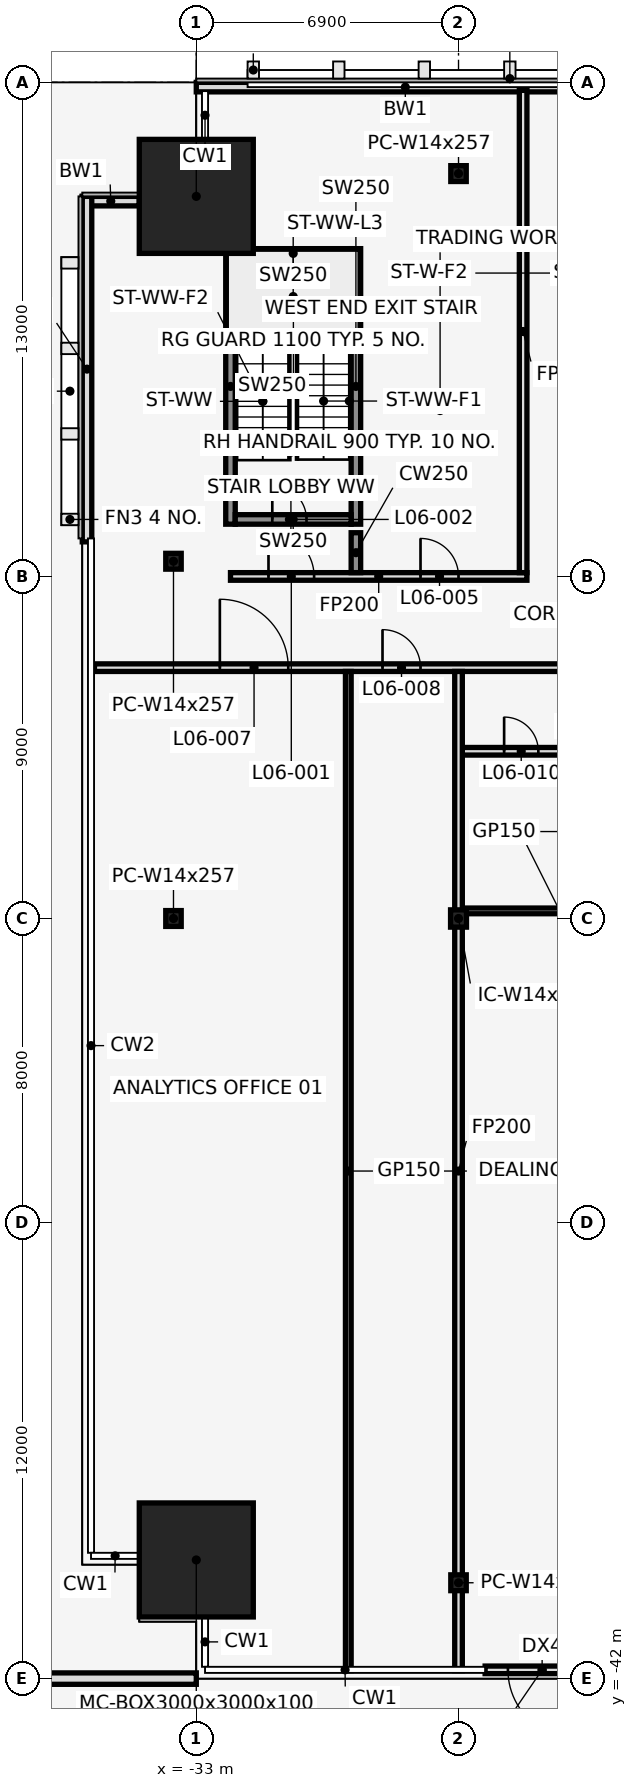
"""IFC4 building model, lengths in metres.
Left out: names, types, materials, properties, quantities, classifications, styles, units other than length and angle.
Written with IfcOpenShell. Run it as: python <this file> out.ifc"""

import sys

from ifc_helpers import new_model, si_unit, direction, frame, frame_2d, origin, origin_2d, place, context, subcontext, project, spatial, rectangle, hollow_rectangle, i_section, extrude, element, fill, save


model = new_model("IFC4")
c1 = context("Model", 3, precision=1e-05, world=origin(), true_north=direction((0.0, 1.0)))
c2 = subcontext(c1, "Body", "Model", "MODEL_VIEW")
j1 = project(units=[si_unit("LENGTHUNIT", "METRE"), si_unit("PLANEANGLEUNIT", "RADIAN")], contexts=[c1])
p1 = place(None, origin())
s1 = spatial("IfcSite", under=j1, at=p1, CompositionType="ELEMENT")
p2 = place(p1, origin())
s2 = spatial("IfcBuilding", under=s1, at=p2, CompositionType="ELEMENT")
p3 = place(p2, frame((0.0, 0.0, 35.0)))
s3 = spatial("IfcBuildingStorey", under=s2, at=p3, CompositionType="ELEMENT", Elevation=35.0)
for number, where, z_axis, x_axis in (
    (1, (-33.0, -38.878, 0.0), (0.0, 0.0, 1.0), (1.0, 0.0, 0.0)),
    (2, (-33.0, -3.0, 0.0), (0.0, 0.0, 1.0), (1.0, 0.0, 0.0)),
):
    element("IfcColumn", number, at=place(p3, frame(where, z_axis=z_axis, x_axis=x_axis)), inside=s3, PredefinedType="COLUMN", context=c2, shape_type="SweptSolid", body=[
        extrude(hollow_rectangle(XDim=3.0, YDim=3.0, WallThickness=0.1, at=origin_2d()), origin(), (0.0, 0.0, 1.0), 4.5),
    ])
for number, where, z_axis, x_axis in (
    (3, (-26.1, -39.478, 0.0), (0.0, 0.0, 1.0), (1.0, 0.0, 0.0)),
    (4, (-26.1, -2.4, 0.0), (0.0, 0.0, 1.0), (1.0, 0.0, 0.0)),
    (5, (-33.6, -12.6, 0.0), (0.0, 0.0, 1.0), (1.0, 0.0, 0.0)),
    (6, (-33.6, -22.0, 0.0), (0.0, 0.0, 1.0), (1.0, 0.0, 0.0)),
):
    element("IfcColumn", number, at=place(p3, frame(where, z_axis=z_axis, x_axis=x_axis)), inside=s3, PredefinedType="COLUMN", context=c2, shape_type="SweptSolid", body=[
        extrude(i_section(OverallWidth=0.406, OverallDepth=0.417, WebThickness=0.03, FlangeThickness=0.048, at=origin_2d()), origin(), (0.0, 0.0, 1.0), 4.5),
    ])
p4 = place(p3, frame((-26.1, -22.0, 0.0), z_axis=(0.0, 0.0, 1.0), x_axis=(1.0, 0.0, 0.0)))
e7 = element("IfcColumn", 7, at=p4, inside=s3, PredefinedType="COLUMN", context=c2, shape_type="SweptSolid", body=[
    extrude(i_section(OverallWidth=0.419, OverallDepth=0.455, WebThickness=0.042, FlangeThickness=0.068, at=origin_2d()), origin(), (0.0, 0.0, 1.0), 4.5),
])
p5 = place(p3, frame((-22.0, -0.125, 0.0), z_axis=(0.0, 0.0, 1.0), x_axis=(-1.0, 0.0, 0.0)))
e8 = element("IfcWall", 8, at=p5, inside=s3, PredefinedType="STANDARD", context=c2, shape_type="SweptSolid", body=[
    extrude(rectangle(XDim=11.0, YDim=0.25, at=frame_2d((5.5, 0.0))), origin(), (0.0, 0.0, 1.0), 4.35),
])
p6 = place(p3, frame((-34.5, -3.125, 0.0), z_axis=(0.0, 0.0, 1.0), x_axis=(-1.0, 0.0, 0.0)))
e9 = element("IfcWall", 9, at=p6, inside=s3, PredefinedType="STANDARD", context=c2, shape_type="SweptSolid", body=[
    extrude(rectangle(XDim=1.5, YDim=0.25, at=frame_2d((0.75, 0.0))), origin(), (0.0, 0.0, 1.0), 4.35),
])
p7 = place(p3, frame((-35.875, -3.0, 0.0), z_axis=(0.0, 0.0, 1.0), x_axis=(0.0, -1.0, 0.0)))
e10 = element("IfcWall", 10, at=p7, inside=s3, PredefinedType="STANDARD", context=c2, shape_type="SweptSolid", body=[
    extrude(rectangle(XDim=9.09, YDim=0.25, at=frame_2d((4.545, 0.0))), origin(), (0.0, 0.0, 1.0), 4.35),
])
p8 = place(p3, frame((-22.4, -41.77, 0.0), z_axis=(0.0, 0.0, 1.0), x_axis=(-1.0, 0.0, 0.0)))
e11 = element("IfcWall", 11, at=p8, inside=s3, PredefinedType="STANDARD", context=c2, shape_type="SweptSolid", body=[
    extrude(rectangle(XDim=3.0, YDim=0.2, at=frame_2d((1.5, 0.0))), origin(), (0.0, 0.0, 1.0), 4.35),
])
p9 = place(p8, frame((0.6, 0.0, 0.0)))
e12 = element("IfcOpeningElement", 12, at=p9, cuts=e11, PredefinedType="OPENING", context=c2, shape_type="SweptSolid", body=[
    extrude(rectangle(XDim=1.8, YDim=2.4, at=frame_2d((0.9, 1.2))), frame((0.0, 0.112, 0.0), z_axis=(0.0, -1.0, 0.0), x_axis=(1.0, 0.0, 0.0)), (0.0, 0.0, 1.0), 0.224),
])
p10 = place(p3, frame((-43.2, -42.0, 0.0), z_axis=(0.0, 0.0, 1.0), x_axis=(1.0, 0.0, 0.0)))
e13 = element("IfcWall", 13, at=p10, inside=s3, PredefinedType="PARAPET", context=c2, shape_type="SweptSolid", body=[
    extrude(rectangle(XDim=10.2, YDim=0.3, at=frame_2d((5.1, 0.0))), origin(), (0.0, 0.0, 1.0), 1.1),
])
for number, where, z_axis, x_axis in (
    (14, (-32.1, -11.625, 0.0), (0.0, 0.0, 1.0), (0.0, 1.0, 0.0)),
    (15, (-28.8, -11.625, 0.0), (0.0, 0.0, 1.0), (0.0, 1.0, 0.0)),
):
    element("IfcWall", number, at=place(p3, frame(where, z_axis=z_axis, x_axis=x_axis)), inside=s3, PredefinedType="SHEAR", context=c2, shape_type="SweptSolid", body=[
        extrude(rectangle(XDim=7.25, YDim=0.25, at=frame_2d((3.625, 0.0))), origin(), (0.0, 0.0, 1.0), 4.5),
    ])
p11 = place(p3, frame((-31.975, -11.5, 0.0), z_axis=(0.0, 0.0, 1.0), x_axis=(1.0, 0.0, 0.0)))
e16 = element("IfcWall", 16, at=p11, inside=s3, PredefinedType="SHEAR", context=c2, shape_type="SweptSolid", body=[
    extrude(rectangle(XDim=3.05, YDim=0.25, at=frame_2d((1.525, 0.0))), origin(), (0.0, 0.0, 1.0), 4.5),
])
p12 = place(p11, frame((0.975, 0.0, 0.0)))
e17 = element("IfcOpeningElement", 17, at=p12, cuts=e16, PredefinedType="OPENING", context=c2, shape_type="SweptSolid", body=[
    extrude(rectangle(XDim=0.9, YDim=2.1, at=frame_2d((0.45, 1.05))), frame((0.0, 0.137, 0.0), z_axis=(0.0, -1.0, 0.0), x_axis=(1.0, 0.0, 0.0)), (0.0, 0.0, 1.0), 0.274),
])
p13 = place(p3, frame((-31.975, -4.5, 0.0), z_axis=(0.0, 0.0, 1.0), x_axis=(1.0, 0.0, 0.0)))
e18 = element("IfcWall", 18, at=p13, inside=s3, PredefinedType="SHEAR", context=c2, shape_type="SweptSolid", body=[
    extrude(rectangle(XDim=3.05, YDim=0.25, at=frame_2d((1.525, 0.0))), origin(), (0.0, 0.0, 1.0), 4.5),
])
p14 = place(p3, frame((-26.0, -21.8, 0.0), z_axis=(0.0, 0.0, 1.0), x_axis=(1.0, 0.0, 0.0)))
e19 = element("IfcWall", 19, at=p14, inside=s3, PredefinedType="PARTITIONING", context=c2, shape_type="SweptSolid", body=[
    extrude(rectangle(XDim=8.7, YDim=0.15, at=frame_2d((4.35, 0.0))), origin(), (0.0, 0.0, 1.0), 3.36),
])
p15 = place(p3, frame((-26.0, -17.6, 0.0), z_axis=(0.0, 0.0, 1.0), x_axis=(1.0, 0.0, 0.0)))
e20 = element("IfcWall", 20, at=p15, inside=s3, PredefinedType="PARTITIONING", context=c2, shape_type="SweptSolid", body=[
    extrude(rectangle(XDim=8.5, YDim=0.2, at=frame_2d((4.25, 0.0))), origin(), (0.0, 0.0, 1.0), 3.36),
])
p16 = place(p15, frame((1.1, 0.0, 0.0)))
e21 = element("IfcOpeningElement", 21, at=p16, cuts=e20, PredefinedType="OPENING", context=c2, shape_type="SweptSolid", body=[
    extrude(rectangle(XDim=0.9, YDim=2.1, at=frame_2d((0.45, 1.05))), frame((0.0, 0.112, 0.0), z_axis=(0.0, -1.0, 0.0), x_axis=(1.0, 0.0, 0.0)), (0.0, 0.0, 1.0), 0.224),
])
p17 = place(p15, frame((4.3, 0.0, 0.0)))
e22 = element("IfcOpeningElement", 22, at=p17, cuts=e20, PredefinedType="OPENING", context=c2, shape_type="SweptSolid", body=[
    extrude(rectangle(XDim=0.9, YDim=2.1, at=frame_2d((0.45, 1.05))), frame((0.0, 0.112, 0.0), z_axis=(0.0, -1.0, 0.0), x_axis=(1.0, 0.0, 0.0)), (0.0, 0.0, 1.0), 0.224),
])
p18 = place(p15, frame((6.9, 0.0, 0.0)))
e23 = element("IfcOpeningElement", 23, at=p18, cuts=e20, PredefinedType="OPENING", context=c2, shape_type="SweptSolid", body=[
    extrude(rectangle(XDim=1.0, YDim=2.1, at=frame_2d((0.5, 1.05))), frame((0.0, 0.112, 0.0), z_axis=(0.0, -1.0, 0.0), x_axis=(1.0, 0.0, 0.0)), (0.0, 0.0, 1.0), 0.224),
])
p19 = place(p3, frame((-35.68, -15.4, 0.0), z_axis=(0.0, 0.0, 1.0), x_axis=(1.0, 0.0, 0.0)))
e24 = element("IfcWall", 24, at=p19, inside=s3, PredefinedType="PARTITIONING", context=c2, shape_type="SweptSolid", body=[
    extrude(rectangle(XDim=71.36, YDim=0.2, at=frame_2d((35.68, 0.0))), origin(), (0.0, 0.0, 1.0), 3.36),
])
p20 = place(p19, frame((3.3, 0.0, 0.0)))
e25 = element("IfcOpeningElement", 25, at=p20, cuts=e24, PredefinedType="OPENING", context=c2, shape_type="SweptSolid", body=[
    extrude(rectangle(XDim=1.8, YDim=2.1, at=frame_2d((0.9, 1.05))), frame((0.0, 0.112, 0.0), z_axis=(0.0, -1.0, 0.0), x_axis=(1.0, 0.0, 0.0)), (0.0, 0.0, 1.0), 0.224),
])
p21 = place(p19, frame((7.58, 0.0, 0.0)))
e26 = element("IfcOpeningElement", 26, at=p21, cuts=e24, PredefinedType="OPENING", context=c2, shape_type="SweptSolid", body=[
    extrude(rectangle(XDim=1.0, YDim=2.1, at=frame_2d((0.5, 1.05))), frame((0.0, 0.112, 0.0), z_axis=(0.0, -1.0, 0.0), x_axis=(1.0, 0.0, 0.0)), (0.0, 0.0, 1.0), 0.224),
])
p22 = place(p19, frame((13.48, 0.0, 0.0)))
e27 = element("IfcOpeningElement", 27, at=p22, cuts=e24, PredefinedType="OPENING", context=c2, shape_type="SweptSolid", body=[
    extrude(rectangle(XDim=0.9, YDim=2.1, at=frame_2d((0.45, 1.05))), frame((0.0, 0.112, 0.0), z_axis=(0.0, -1.0, 0.0), x_axis=(1.0, 0.0, 0.0)), (0.0, 0.0, 1.0), 0.224),
])
p23 = place(p19, frame((21.68, 0.0, 0.0)))
e28 = element("IfcOpeningElement", 28, at=p23, cuts=e24, PredefinedType="OPENING", context=c2, shape_type="SweptSolid", body=[
    extrude(rectangle(XDim=1.8, YDim=2.1, at=frame_2d((0.9, 1.05))), frame((0.0, 0.112, 0.0), z_axis=(0.0, -1.0, 0.0), x_axis=(1.0, 0.0, 0.0)), (0.0, 0.0, 1.0), 0.224),
])
p24 = place(p19, frame((30.38, 0.0, 0.0)))
e29 = element("IfcOpeningElement", 29, at=p24, cuts=e24, PredefinedType="OPENING", context=c2, shape_type="SweptSolid", body=[
    extrude(rectangle(XDim=1.8, YDim=2.1, at=frame_2d((0.9, 1.05))), frame((0.0, 0.112, 0.0), z_axis=(0.0, -1.0, 0.0), x_axis=(1.0, 0.0, 0.0)), (0.0, 0.0, 1.0), 0.224),
])
p25 = place(p19, frame((40.58, 0.0, 0.0)))
e30 = element("IfcOpeningElement", 30, at=p25, cuts=e24, PredefinedType="OPENING", context=c2, shape_type="SweptSolid", body=[
    extrude(rectangle(XDim=1.8, YDim=2.1, at=frame_2d((0.9, 1.05))), frame((0.0, 0.112, 0.0), z_axis=(0.0, -1.0, 0.0), x_axis=(1.0, 0.0, 0.0)), (0.0, 0.0, 1.0), 0.224),
])
p26 = place(p19, frame((53.68, 0.0, 0.0)))
e31 = element("IfcOpeningElement", 31, at=p26, cuts=e24, PredefinedType="OPENING", context=c2, shape_type="SweptSolid", body=[
    extrude(rectangle(XDim=1.8, YDim=2.1, at=frame_2d((0.9, 1.05))), frame((0.0, 0.112, 0.0), z_axis=(0.0, -1.0, 0.0), x_axis=(1.0, 0.0, 0.0)), (0.0, 0.0, 1.0), 0.224),
])
p27 = place(p19, frame((65.68, 0.0, 0.0)))
e32 = element("IfcOpeningElement", 32, at=p27, cuts=e24, PredefinedType="OPENING", context=c2, shape_type="SweptSolid", body=[
    extrude(rectangle(XDim=1.8, YDim=2.1, at=frame_2d((0.9, 1.05))), frame((0.0, 0.112, 0.0), z_axis=(0.0, -1.0, 0.0), x_axis=(1.0, 0.0, 0.0)), (0.0, 0.0, 1.0), 0.224),
])
p28 = place(p3, frame((-32.1, -13.0, 0.0), z_axis=(0.0, 0.0, 1.0), x_axis=(1.0, 0.0, 0.0)))
e33 = element("IfcWall", 33, at=p28, inside=s3, PredefinedType="PARTITIONING", context=c2, shape_type="SweptSolid", body=[
    extrude(rectangle(XDim=7.8, YDim=0.2, at=frame_2d((3.9, 0.0))), origin(), (0.0, 0.0, 1.0), 3.36),
])
p29 = place(p28, frame((1.0, 0.0, 0.0)))
e34 = element("IfcOpeningElement", 34, at=p29, cuts=e33, PredefinedType="OPENING", context=c2, shape_type="SweptSolid", body=[
    extrude(rectangle(XDim=1.2, YDim=2.1, at=frame_2d((0.6, 1.05))), frame((0.0, 0.112, 0.0), z_axis=(0.0, -1.0, 0.0), x_axis=(1.0, 0.0, 0.0)), (0.0, 0.0, 1.0), 0.224),
])
p30 = place(p28, frame((5.0, 0.0, 0.0)))
e35 = element("IfcOpeningElement", 35, at=p30, cuts=e33, PredefinedType="OPENING", context=c2, shape_type="SweptSolid", body=[
    extrude(rectangle(XDim=1.0, YDim=2.1, at=frame_2d((0.5, 1.05))), frame((0.0, 0.112, 0.0), z_axis=(0.0, -1.0, 0.0), x_axis=(1.0, 0.0, 0.0)), (0.0, 0.0, 1.0), 0.224),
])
p31 = place(p3, frame((-29.0, -41.79, 0.0), z_axis=(0.0, 0.0, 1.0), x_axis=(0.0, 1.0, 0.0)))
e36 = element("IfcWall", 36, at=p31, inside=s3, PredefinedType="PARTITIONING", context=c2, shape_type="SweptSolid", body=[
    extrude(rectangle(XDim=26.29, YDim=0.15, at=frame_2d((13.145, 0.0))), origin(), (0.0, 0.0, 1.0), 3.36),
])
p32 = place(p3, frame((-28.8, -12.9, 0.0), z_axis=(0.0, 0.0, 1.0), x_axis=(0.0, 1.0, 0.0)))
e37 = element("IfcWall", 37, at=p32, inside=s3, PredefinedType="SHEAR", context=c2, shape_type="SweptSolid", body=[
    extrude(rectangle(XDim=1.05, YDim=0.25, at=frame_2d((0.525, 0.0))), origin(), (0.0, 0.0, 1.0), 4.5),
])
p33 = place(p3, frame((-26.1, -41.79, 0.0), z_axis=(0.0, 0.0, 1.0), x_axis=(0.0, 1.0, 0.0)))
e38 = element("IfcWall", 38, at=p33, inside=s3, PredefinedType="PARTITIONING", context=c2, shape_type="SweptSolid", body=[
    extrude(rectangle(XDim=26.29, YDim=0.2, at=frame_2d((13.145, 0.0))), origin(), (0.0, 0.0, 1.0), 3.36),
])
p34 = place(p3, frame((-24.4, -12.9, 0.0), z_axis=(0.0, 0.0, 1.0), x_axis=(0.0, 1.0, 0.0)))
e39 = element("IfcWall", 39, at=p34, inside=s3, PredefinedType="PARTITIONING", context=c2, shape_type="SweptSolid", body=[
    extrude(rectangle(XDim=12.69, YDim=0.2, at=frame_2d((6.345, 0.0))), origin(), (0.0, 0.0, 1.0), 3.36),
])
p35 = place(p9, origin())
e40 = element("IfcDoor", 40, at=p35, inside=s3, OperationType="SINGLE_SWING_LEFT", PredefinedType="DOOR", context=c2, shape_type="SweptSolid", body=[
    extrude(rectangle(XDim=1.8, YDim=2.4, at=frame_2d((0.9, 1.2))), frame((0.0, 0.025, 0.0), z_axis=(0.0, -1.0, 0.0), x_axis=(1.0, 0.0, 0.0)), (0.0, 0.0, 1.0), 0.05),
])
fill(e12, e40)
p36 = place(p29, origin())
e41 = element("IfcDoor", 41, at=p36, inside=s3, OperationType="SINGLE_SWING_LEFT", PredefinedType="DOOR", context=c2, shape_type="SweptSolid", body=[
    extrude(rectangle(XDim=1.2, YDim=2.1, at=frame_2d((0.6, 1.05))), frame((0.0, 0.025, 0.0), z_axis=(0.0, -1.0, 0.0), x_axis=(1.0, 0.0, 0.0)), (0.0, 0.0, 1.0), 0.05),
])
fill(e34, e41)
p37 = place(p12, origin())
e42 = element("IfcDoor", 42, at=p37, inside=s3, OperationType="SINGLE_SWING_LEFT", PredefinedType="DOOR", context=c2, shape_type="SweptSolid", body=[
    extrude(rectangle(XDim=0.9, YDim=2.1, at=frame_2d((0.45, 1.05))), frame((0.0, 0.025, 0.0), z_axis=(0.0, -1.0, 0.0), x_axis=(1.0, 0.0, 0.0)), (0.0, 0.0, 1.0), 0.05),
])
fill(e17, e42)
p38 = place(p30, origin())
e43 = element("IfcDoor", 43, at=p38, inside=s3, OperationType="SINGLE_SWING_LEFT", PredefinedType="DOOR", context=c2, shape_type="SweptSolid", body=[
    extrude(rectangle(XDim=1.0, YDim=2.1, at=frame_2d((0.5, 1.05))), frame((0.0, 0.025, 0.0), z_axis=(0.0, -1.0, 0.0), x_axis=(1.0, 0.0, 0.0)), (0.0, 0.0, 1.0), 0.05),
])
fill(e35, e43)
p39 = place(p20, origin())
e44 = element("IfcDoor", 44, at=p39, inside=s3, OperationType="SINGLE_SWING_LEFT", PredefinedType="DOOR", context=c2, shape_type="SweptSolid", body=[
    extrude(rectangle(XDim=1.8, YDim=2.1, at=frame_2d((0.9, 1.05))), frame((0.0, 0.025, 0.0), z_axis=(0.0, -1.0, 0.0), x_axis=(1.0, 0.0, 0.0)), (0.0, 0.0, 1.0), 0.05),
])
fill(e25, e44)
p40 = place(p21, frame((1.0, 0.0, 0.0), z_axis=(0.0, 0.0, 1.0), x_axis=(-1.0, 0.0, 0.0)))
e45 = element("IfcDoor", 45, at=p40, inside=s3, OperationType="SINGLE_SWING_RIGHT", PredefinedType="DOOR", context=c2, shape_type="SweptSolid", body=[
    extrude(rectangle(XDim=1.0, YDim=2.1, at=frame_2d((0.5, 1.05))), frame((0.0, 0.025, 0.0), z_axis=(0.0, -1.0, 0.0), x_axis=(1.0, 0.0, 0.0)), (0.0, 0.0, 1.0), 0.05),
])
fill(e26, e45)
p41 = place(p16, frame((0.9, 0.0, 0.0), z_axis=(0.0, 0.0, 1.0), x_axis=(-1.0, 0.0, 0.0)))
e46 = element("IfcDoor", 46, at=p41, inside=s3, OperationType="SINGLE_SWING_LEFT", PredefinedType="DOOR", context=c2, shape_type="SweptSolid", body=[
    extrude(rectangle(XDim=0.9, YDim=2.1, at=frame_2d((0.45, 1.05))), frame((0.0, 0.025, 0.0), z_axis=(0.0, -1.0, 0.0), x_axis=(1.0, 0.0, 0.0)), (0.0, 0.0, 1.0), 0.05),
])
fill(e21, e46)
save(model, sys.argv[1])
